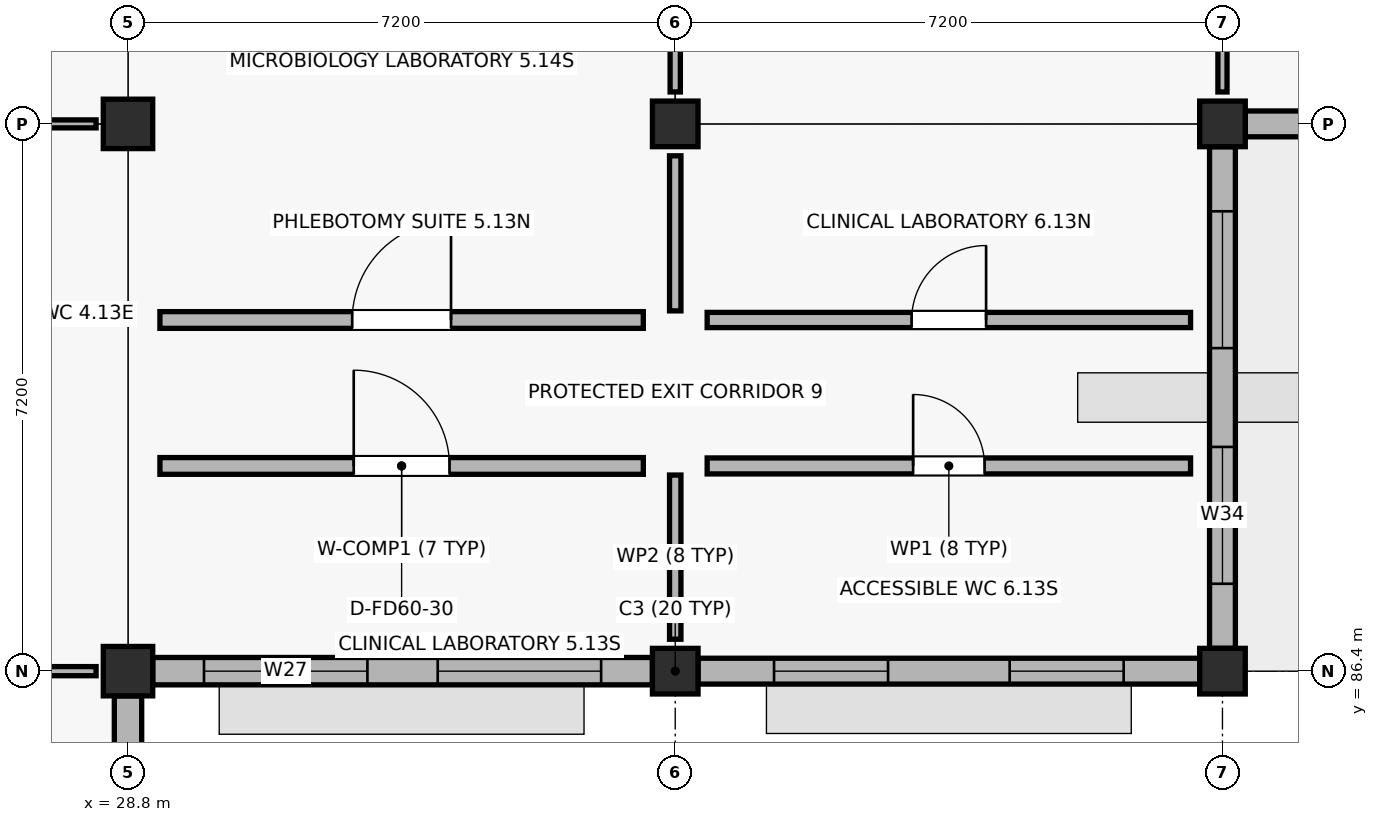
"""IFC4 building model, lengths in metres.
Left out: names, types, materials, properties, quantities, classifications, styles, units other than length and angle.
Written with IfcOpenShell. Run it as: python <this file> out.ifc"""

import sys

from ifc_helpers import new_model, si_unit, direction, frame, frame_2d, origin, origin_2d, place, context, subcontext, project, spatial, rectangle, extrude, element, fill, save


model = new_model("IFC4")
c1 = context("Model", 3, precision=1e-05, world=origin(), true_north=direction((0.0, 1.0)))
c2 = subcontext(c1, "Body", "Model", "MODEL_VIEW")
j1 = project(units=[si_unit("LENGTHUNIT", "METRE"), si_unit("PLANEANGLEUNIT", "RADIAN")], contexts=[c1])
p1 = place(None, origin())
s1 = spatial("IfcSite", under=j1, at=p1, CompositionType="ELEMENT")
p2 = place(p1, origin())
s2 = spatial("IfcBuilding", under=s1, at=p2, CompositionType="ELEMENT")
p3 = place(p2, origin())
s3 = spatial("IfcBuildingStorey", under=s2, at=p3, CompositionType="ELEMENT", Elevation=0.0)
for number, where, z_axis, x_axis in (
    (1, (28.8, 86.4, -0.25), (0.0, 0.0, 1.0), (1.0, 0.0, 0.0)),
    (2, (28.8, 93.6, -0.25), (0.0, 0.0, 1.0), (1.0, 0.0, 0.0)),
):
    element("IfcColumn", number, at=place(p3, frame(where, z_axis=z_axis, x_axis=x_axis)), inside=s3, PredefinedType="COLUMN", context=c2, shape_type="SweptSolid", body=[
        extrude(rectangle(XDim=0.65, YDim=0.65, at=origin_2d()), origin(), (0.0, 0.0, 1.0), 4.75),
    ])
for number, where, z_axis, x_axis in (
    (3, (36.0, 86.4, -0.25), (0.0, 0.0, 1.0), (1.0, 0.0, 0.0)),
    (4, (36.0, 93.6, -0.25), (0.0, 0.0, 1.0), (1.0, 0.0, 0.0)),
    (5, (43.2, 86.4, -0.25), (0.0, 0.0, 1.0), (1.0, 0.0, 0.0)),
    (6, (43.2, 93.6, -0.25), (0.0, 0.0, 1.0), (1.0, 0.0, 0.0)),
):
    element("IfcColumn", number, at=place(p3, frame(where, z_axis=z_axis, x_axis=x_axis)), inside=s3, PredefinedType="COLUMN", context=c2, shape_type="SweptSolid", body=[
        extrude(rectangle(XDim=0.6, YDim=0.6, at=origin_2d()), origin(), (0.0, 0.0, 1.0), 4.75),
    ])
p4 = place(p3, frame((28.8, 79.525, 0.0), z_axis=(0.0, 0.0, 1.0), x_axis=(0.0, 1.0, 0.0)))
e7 = element("IfcWall", 7, at=p4, inside=s3, PredefinedType="SOLIDWALL", context=c2, shape_type="SweptSolid", body=[
    extrude(rectangle(XDim=6.55, YDim=0.36, at=frame_2d((3.275, 0.0))), origin(), (0.0, 0.0, 1.0), 3.52),
])
p5 = place(p4, frame((0.775, 0.0, 0.9)))
e8 = element("IfcOpeningElement", 8, at=p5, cuts=e7, PredefinedType="OPENING", context=c2, shape_type="SweptSolid", body=[
    extrude(rectangle(XDim=1.95, YDim=1.38, at=frame_2d((0.975, 0.69))), frame((0.0, 0.19, 0.0), z_axis=(0.0, -1.0, 0.0), x_axis=(1.0, 0.0, 0.0)), (0.0, 0.0, 1.0), 0.38),
])
p6 = place(p4, frame((3.825, 0.0, 0.9)))
e9 = element("IfcOpeningElement", 9, at=p6, cuts=e7, PredefinedType="OPENING", context=c2, shape_type="SweptSolid", body=[
    extrude(rectangle(XDim=1.95, YDim=1.38, at=frame_2d((0.975, 0.69))), frame((0.0, 0.19, 0.0), z_axis=(0.0, -1.0, 0.0), x_axis=(1.0, 0.0, 0.0)), (0.0, 0.0, 1.0), 0.38),
])
p7 = place(p3, frame((29.125, 86.4, 0.0), z_axis=(0.0, 0.0, 1.0), x_axis=(1.0, 0.0, 0.0)))
e10 = element("IfcWall", 10, at=p7, inside=s3, PredefinedType="SOLIDWALL", context=c2, shape_type="SweptSolid", body=[
    extrude(rectangle(XDim=6.575, YDim=0.36, at=frame_2d((3.288, 0.0))), origin(), (0.0, 0.0, 1.0), 3.47),
])
p8 = place(p7, frame((0.675, 0.0, 0.9)))
e11 = element("IfcOpeningElement", 11, at=p8, cuts=e10, PredefinedType="OPENING", context=c2, shape_type="SweptSolid", body=[
    extrude(rectangle(XDim=2.15, YDim=1.5, at=frame_2d((1.075, 0.75))), frame((0.0, 0.19, 0.0), z_axis=(0.0, -1.0, 0.0), x_axis=(1.0, 0.0, 0.0)), (0.0, 0.0, 1.0), 0.38),
])
p9 = place(p7, frame((3.75, 0.0, 0.9)))
e12 = element("IfcOpeningElement", 12, at=p9, cuts=e10, PredefinedType="OPENING", context=c2, shape_type="SweptSolid", body=[
    extrude(rectangle(XDim=2.15, YDim=1.5, at=frame_2d((1.075, 0.75))), frame((0.0, 0.19, 0.0), z_axis=(0.0, -1.0, 0.0), x_axis=(1.0, 0.0, 0.0)), (0.0, 0.0, 1.0), 0.38),
])
p10 = place(p3, frame((36.3, 86.4, 0.0), z_axis=(0.0, 0.0, 1.0), x_axis=(1.0, 0.0, 0.0)))
e13 = element("IfcWall", 13, at=p10, inside=s3, PredefinedType="SOLIDWALL", context=c2, shape_type="SweptSolid", body=[
    extrude(rectangle(XDim=6.6, YDim=0.34, at=frame_2d((3.3, 0.0))), origin(), (0.0, 0.0, 1.0), 3.47),
])
p11 = place(p10, frame((1.0, 0.0, 0.9)))
e14 = element("IfcOpeningElement", 14, at=p11, cuts=e13, PredefinedType="OPENING", context=c2, shape_type="SweptSolid", body=[
    extrude(rectangle(XDim=1.5, YDim=1.62, at=frame_2d((0.75, 0.81))), frame((0.0, 0.18, 0.0), z_axis=(0.0, -1.0, 0.0), x_axis=(1.0, 0.0, 0.0)), (0.0, 0.0, 1.0), 0.36),
])
p12 = place(p10, frame((4.1, 0.0, 0.9)))
e15 = element("IfcOpeningElement", 15, at=p12, cuts=e13, PredefinedType="OPENING", context=c2, shape_type="SweptSolid", body=[
    extrude(rectangle(XDim=1.5, YDim=1.62, at=frame_2d((0.75, 0.81))), frame((0.0, 0.18, 0.0), z_axis=(0.0, -1.0, 0.0), x_axis=(1.0, 0.0, 0.0)), (0.0, 0.0, 1.0), 0.36),
])
p13 = place(p3, frame((43.2, 86.7, 0.0), z_axis=(0.0, 0.0, 1.0), x_axis=(0.0, 1.0, 0.0)))
e16 = element("IfcWall", 16, at=p13, inside=s3, PredefinedType="SOLIDWALL", context=c2, shape_type="SweptSolid", body=[
    extrude(rectangle(XDim=6.6, YDim=0.34, at=frame_2d((3.3, 0.0))), origin(), (0.0, 0.0, 1.0), 3.52),
])
p14 = place(p13, frame((0.85, 0.0, 0.9)))
e17 = element("IfcOpeningElement", 17, at=p14, cuts=e16, PredefinedType="OPENING", context=c2, shape_type="SweptSolid", body=[
    extrude(rectangle(XDim=1.8, YDim=1.62, at=frame_2d((0.9, 0.81))), frame((0.0, 0.18, 0.0), z_axis=(0.0, -1.0, 0.0), x_axis=(1.0, 0.0, 0.0)), (0.0, 0.0, 1.0), 0.36),
])
p15 = place(p13, frame((3.95, 0.0, 0.9)))
e18 = element("IfcOpeningElement", 18, at=p15, cuts=e16, PredefinedType="OPENING", context=c2, shape_type="SweptSolid", body=[
    extrude(rectangle(XDim=1.8, YDim=1.62, at=frame_2d((0.9, 0.81))), frame((0.0, 0.18, 0.0), z_axis=(0.0, -1.0, 0.0), x_axis=(1.0, 0.0, 0.0)), (0.0, 0.0, 1.0), 0.36),
])
p16 = place(p3, frame((43.5, 93.6, 0.0), z_axis=(0.0, 0.0, 1.0), x_axis=(1.0, 0.0, 0.0)))
e19 = element("IfcWall", 19, at=p16, inside=s3, PredefinedType="SOLIDWALL", context=c2, shape_type="SweptSolid", body=[
    extrude(rectangle(XDim=6.6, YDim=0.34, at=frame_2d((3.3, 0.0))), origin(), (0.0, 0.0, 1.0), 3.47),
])
p17 = place(p16, frame((1.075, 0.0, 0.9)))
e20 = element("IfcOpeningElement", 20, at=p17, cuts=e19, PredefinedType="OPENING", context=c2, shape_type="SweptSolid", body=[
    extrude(rectangle(XDim=1.35, YDim=1.75, at=frame_2d((0.675, 0.875))), frame((0.0, 0.18, 0.0), z_axis=(0.0, -1.0, 0.0), x_axis=(1.0, 0.0, 0.0)), (0.0, 0.0, 1.0), 0.36),
])
p18 = place(p16, frame((4.175, 0.0, 0.9)))
e21 = element("IfcOpeningElement", 21, at=p18, cuts=e19, PredefinedType="OPENING", context=c2, shape_type="SweptSolid", body=[
    extrude(rectangle(XDim=1.35, YDim=1.75, at=frame_2d((0.675, 0.875))), frame((0.0, 0.18, 0.0), z_axis=(0.0, -1.0, 0.0), x_axis=(1.0, 0.0, 0.0)), (0.0, 0.0, 1.0), 0.36),
])
p19 = place(p3, frame((29.22, 89.1, 0.0), z_axis=(0.0, 0.0, 1.0), x_axis=(1.0, 0.0, 0.0)))
e22 = element("IfcWall", 22, at=p19, inside=s3, PredefinedType="SOLIDWALL", context=c2, shape_type="SweptSolid", body=[
    extrude(rectangle(XDim=6.36, YDim=0.22, at=frame_2d((3.18, 0.0))), origin(), (0.0, 0.0, 1.0), 3.36),
])
p20 = place(p19, frame((2.55, 0.0, 0.0)))
e23 = element("IfcOpeningElement", 23, at=p20, cuts=e22, PredefinedType="OPENING", context=c2, shape_type="SweptSolid", body=[
    extrude(rectangle(XDim=1.26, YDim=2.09, at=frame_2d((0.63, 1.045))), frame((0.0, 0.12, 0.0), z_axis=(0.0, -1.0, 0.0), x_axis=(1.0, 0.0, 0.0)), (0.0, 0.0, 1.0), 0.24),
])
p21 = place(p3, frame((36.0, 86.82, 0.0), z_axis=(0.0, 0.0, 1.0), x_axis=(0.0, 1.0, 0.0)))
e24 = element("IfcWall", 24, at=p21, inside=s3, PredefinedType="PARTITIONING", context=c2, shape_type="SweptSolid", body=[
    extrude(rectangle(XDim=2.16, YDim=0.15, at=frame_2d((1.08, 0.0))), origin(), (0.0, 0.0, 1.0), 3.36),
])
p22 = place(p3, frame((29.22, 91.02, 0.0), z_axis=(0.0, 0.0, 1.0), x_axis=(1.0, 0.0, 0.0)))
e25 = element("IfcWall", 25, at=p22, inside=s3, PredefinedType="SOLIDWALL", context=c2, shape_type="SweptSolid", body=[
    extrude(rectangle(XDim=6.36, YDim=0.22, at=frame_2d((3.18, 0.0))), origin(), (0.0, 0.0, 1.0), 3.36),
])
p23 = place(p22, frame((2.53, 0.0, 0.0)))
e26 = element("IfcOpeningElement", 26, at=p23, cuts=e25, PredefinedType="OPENING", context=c2, shape_type="SweptSolid", body=[
    extrude(rectangle(XDim=1.3, YDim=2.09, at=frame_2d((0.65, 1.045))), frame((0.0, 0.12, 0.0), z_axis=(0.0, -1.0, 0.0), x_axis=(1.0, 0.0, 0.0)), (0.0, 0.0, 1.0), 0.24),
])
p24 = place(p3, frame((36.0, 91.14, 0.0), z_axis=(0.0, 0.0, 1.0), x_axis=(0.0, 1.0, 0.0)))
e27 = element("IfcWall", 27, at=p24, inside=s3, PredefinedType="PARTITIONING", context=c2, shape_type="SweptSolid", body=[
    extrude(rectangle(XDim=2.04, YDim=0.15, at=frame_2d((1.02, 0.0))), origin(), (0.0, 0.0, 1.0), 3.36),
])
p25 = place(p3, frame((36.0, 94.02, 0.0), z_axis=(0.0, 0.0, 1.0), x_axis=(0.0, 1.0, 0.0)))
e28 = element("IfcWall", 28, at=p25, inside=s3, PredefinedType="PARTITIONING", context=c2, shape_type="SweptSolid", body=[
    extrude(rectangle(XDim=2.16, YDim=0.135, at=frame_2d((1.08, 0.0))), origin(), (0.0, 0.0, 1.0), 3.36),
])
p26 = place(p3, frame((36.42, 89.1, 0.0), z_axis=(0.0, 0.0, 1.0), x_axis=(1.0, 0.0, 0.0)))
e29 = element("IfcWall", 29, at=p26, inside=s3, PredefinedType="PLUMBINGWALL", context=c2, shape_type="SweptSolid", body=[
    extrude(rectangle(XDim=6.36, YDim=0.21, at=frame_2d((3.18, 0.0))), origin(), (0.0, 0.0, 1.0), 3.36),
])
p27 = place(p26, frame((2.71, 0.0, 0.0)))
e30 = element("IfcOpeningElement", 30, at=p27, cuts=e29, PredefinedType="OPENING", context=c2, shape_type="SweptSolid", body=[
    extrude(rectangle(XDim=0.94, YDim=2.14, at=frame_2d((0.47, 1.07))), frame((0.0, 0.115, 0.0), z_axis=(0.0, -1.0, 0.0), x_axis=(1.0, 0.0, 0.0)), (0.0, 0.0, 1.0), 0.23),
])
p28 = place(p3, frame((36.42, 91.02, 0.0), z_axis=(0.0, 0.0, 1.0), x_axis=(1.0, 0.0, 0.0)))
e31 = element("IfcWall", 31, at=p28, inside=s3, PredefinedType="SOLIDWALL", context=c2, shape_type="SweptSolid", body=[
    extrude(rectangle(XDim=6.36, YDim=0.2, at=frame_2d((3.18, 0.0))), origin(), (0.0, 0.0, 1.0), 3.36),
])
p29 = place(p28, frame((2.69, 0.0, 0.0)))
e32 = element("IfcOpeningElement", 32, at=p29, cuts=e31, PredefinedType="OPENING", context=c2, shape_type="SweptSolid", body=[
    extrude(rectangle(XDim=0.98, YDim=2.14, at=frame_2d((0.49, 1.07))), frame((0.0, 0.11, 0.0), z_axis=(0.0, -1.0, 0.0), x_axis=(1.0, 0.0, 0.0)), (0.0, 0.0, 1.0), 0.22),
])
for number, where, z_axis, x_axis in (
    (33, (43.2, 94.02, 0.0), (0.0, 0.0, 1.0), (0.0, 1.0, 0.0)),
    (34, (26.22, 86.4, 0.0), (0.0, 0.0, 1.0), (1.0, 0.0, 0.0)),
):
    element("IfcWall", number, at=place(p3, frame(where, z_axis=z_axis, x_axis=x_axis)), inside=s3, PredefinedType="PARTITIONING", context=c2, shape_type="SweptSolid", body=[
        extrude(rectangle(XDim=2.16, YDim=0.12, at=frame_2d((1.08, 0.0))), origin(), (0.0, 0.0, 1.0), 3.36),
    ])
p30 = place(p3, frame((26.22, 93.6, 0.0), z_axis=(0.0, 0.0, 1.0), x_axis=(1.0, 0.0, 0.0)))
e35 = element("IfcWall", 35, at=p30, inside=s3, PredefinedType="PARTITIONING", context=c2, shape_type="SweptSolid", body=[
    extrude(rectangle(XDim=2.16, YDim=0.105, at=frame_2d((1.08, 0.0))), origin(), (0.0, 0.0, 1.0), 3.36),
])
p31 = place(p8, origin())
e36 = element("IfcWindow", 36, at=p31, inside=s3, PartitioningType="SINGLE_PANEL", PredefinedType="WINDOW", context=c2, shape_type="SweptSolid", body=[
    extrude(rectangle(XDim=2.15, YDim=1.5, at=frame_2d((1.075, 0.75))), frame((0.0, 0.03, 0.0), z_axis=(0.0, -1.0, 0.0), x_axis=(1.0, 0.0, 0.0)), (0.0, 0.0, 1.0), 0.06),
])
fill(e11, e36)
p32 = place(p9, origin())
e37 = element("IfcWindow", 37, at=p32, inside=s3, PartitioningType="SINGLE_PANEL", PredefinedType="WINDOW", context=c2, shape_type="SweptSolid", body=[
    extrude(rectangle(XDim=2.15, YDim=1.5, at=frame_2d((1.075, 0.75))), frame((0.0, 0.03, 0.0), z_axis=(0.0, -1.0, 0.0), x_axis=(1.0, 0.0, 0.0)), (0.0, 0.0, 1.0), 0.06),
])
fill(e12, e37)
p33 = place(p11, origin())
e38 = element("IfcWindow", 38, at=p33, inside=s3, PartitioningType="SINGLE_PANEL", PredefinedType="WINDOW", context=c2, shape_type="SweptSolid", body=[
    extrude(rectangle(XDim=1.5, YDim=1.62, at=frame_2d((0.75, 0.81))), frame((0.0, 0.03, 0.0), z_axis=(0.0, -1.0, 0.0), x_axis=(1.0, 0.0, 0.0)), (0.0, 0.0, 1.0), 0.06),
])
fill(e14, e38)
p34 = place(p12, origin())
e39 = element("IfcWindow", 39, at=p34, inside=s3, PartitioningType="SINGLE_PANEL", PredefinedType="WINDOW", context=c2, shape_type="SweptSolid", body=[
    extrude(rectangle(XDim=1.5, YDim=1.62, at=frame_2d((0.75, 0.81))), frame((0.0, 0.03, 0.0), z_axis=(0.0, -1.0, 0.0), x_axis=(1.0, 0.0, 0.0)), (0.0, 0.0, 1.0), 0.06),
])
fill(e15, e39)
p35 = place(p14, origin())
e40 = element("IfcWindow", 40, at=p35, inside=s3, PartitioningType="SINGLE_PANEL", PredefinedType="WINDOW", context=c2, shape_type="SweptSolid", body=[
    extrude(rectangle(XDim=1.8, YDim=1.62, at=frame_2d((0.9, 0.81))), frame((0.0, 0.03, 0.0), z_axis=(0.0, -1.0, 0.0), x_axis=(1.0, 0.0, 0.0)), (0.0, 0.0, 1.0), 0.06),
])
fill(e17, e40)
p36 = place(p15, origin())
e41 = element("IfcWindow", 41, at=p36, inside=s3, PartitioningType="SINGLE_PANEL", PredefinedType="WINDOW", context=c2, shape_type="SweptSolid", body=[
    extrude(rectangle(XDim=1.8, YDim=1.62, at=frame_2d((0.9, 0.81))), frame((0.0, 0.03, 0.0), z_axis=(0.0, -1.0, 0.0), x_axis=(1.0, 0.0, 0.0)), (0.0, 0.0, 1.0), 0.06),
])
fill(e18, e41)
p37 = place(p20, origin())
e42 = element("IfcDoor", 42, at=p37, inside=s3, OperationType="SINGLE_SWING_LEFT", PredefinedType="DOOR", context=c2, shape_type="SweptSolid", body=[
    extrude(rectangle(XDim=1.26, YDim=2.09, at=frame_2d((0.63, 1.045))), frame((0.0, 0.025, 0.0), z_axis=(0.0, -1.0, 0.0), x_axis=(1.0, 0.0, 0.0)), (0.0, 0.0, 1.0), 0.05),
])
fill(e23, e42)
p38 = place(p23, origin())
e43 = element("IfcDoor", 43, at=p38, inside=s3, OperationType="SINGLE_SWING_RIGHT", PredefinedType="DOOR", context=c2, shape_type="SweptSolid", body=[
    extrude(rectangle(XDim=1.3, YDim=2.09, at=frame_2d((0.65, 1.045))), frame((0.0, 0.025, 0.0), z_axis=(0.0, -1.0, 0.0), x_axis=(1.0, 0.0, 0.0)), (0.0, 0.0, 1.0), 0.05),
])
fill(e26, e43)
p39 = place(p27, origin())
e44 = element("IfcDoor", 44, at=p39, inside=s3, OperationType="SINGLE_SWING_LEFT", PredefinedType="DOOR", context=c2, shape_type="SweptSolid", body=[
    extrude(rectangle(XDim=0.94, YDim=2.14, at=frame_2d((0.47, 1.07))), frame((0.0, 0.025, 0.0), z_axis=(0.0, -1.0, 0.0), x_axis=(1.0, 0.0, 0.0)), (0.0, 0.0, 1.0), 0.05),
])
fill(e30, e44)
p40 = place(p29, origin())
e45 = element("IfcDoor", 45, at=p40, inside=s3, OperationType="SINGLE_SWING_RIGHT", PredefinedType="DOOR", context=c2, shape_type="SweptSolid", body=[
    extrude(rectangle(XDim=0.98, YDim=2.14, at=frame_2d((0.49, 1.07))), frame((0.0, 0.025, 0.0), z_axis=(0.0, -1.0, 0.0), x_axis=(1.0, 0.0, 0.0)), (0.0, 0.0, 1.0), 0.05),
])
fill(e32, e45)
save(model, sys.argv[1])
